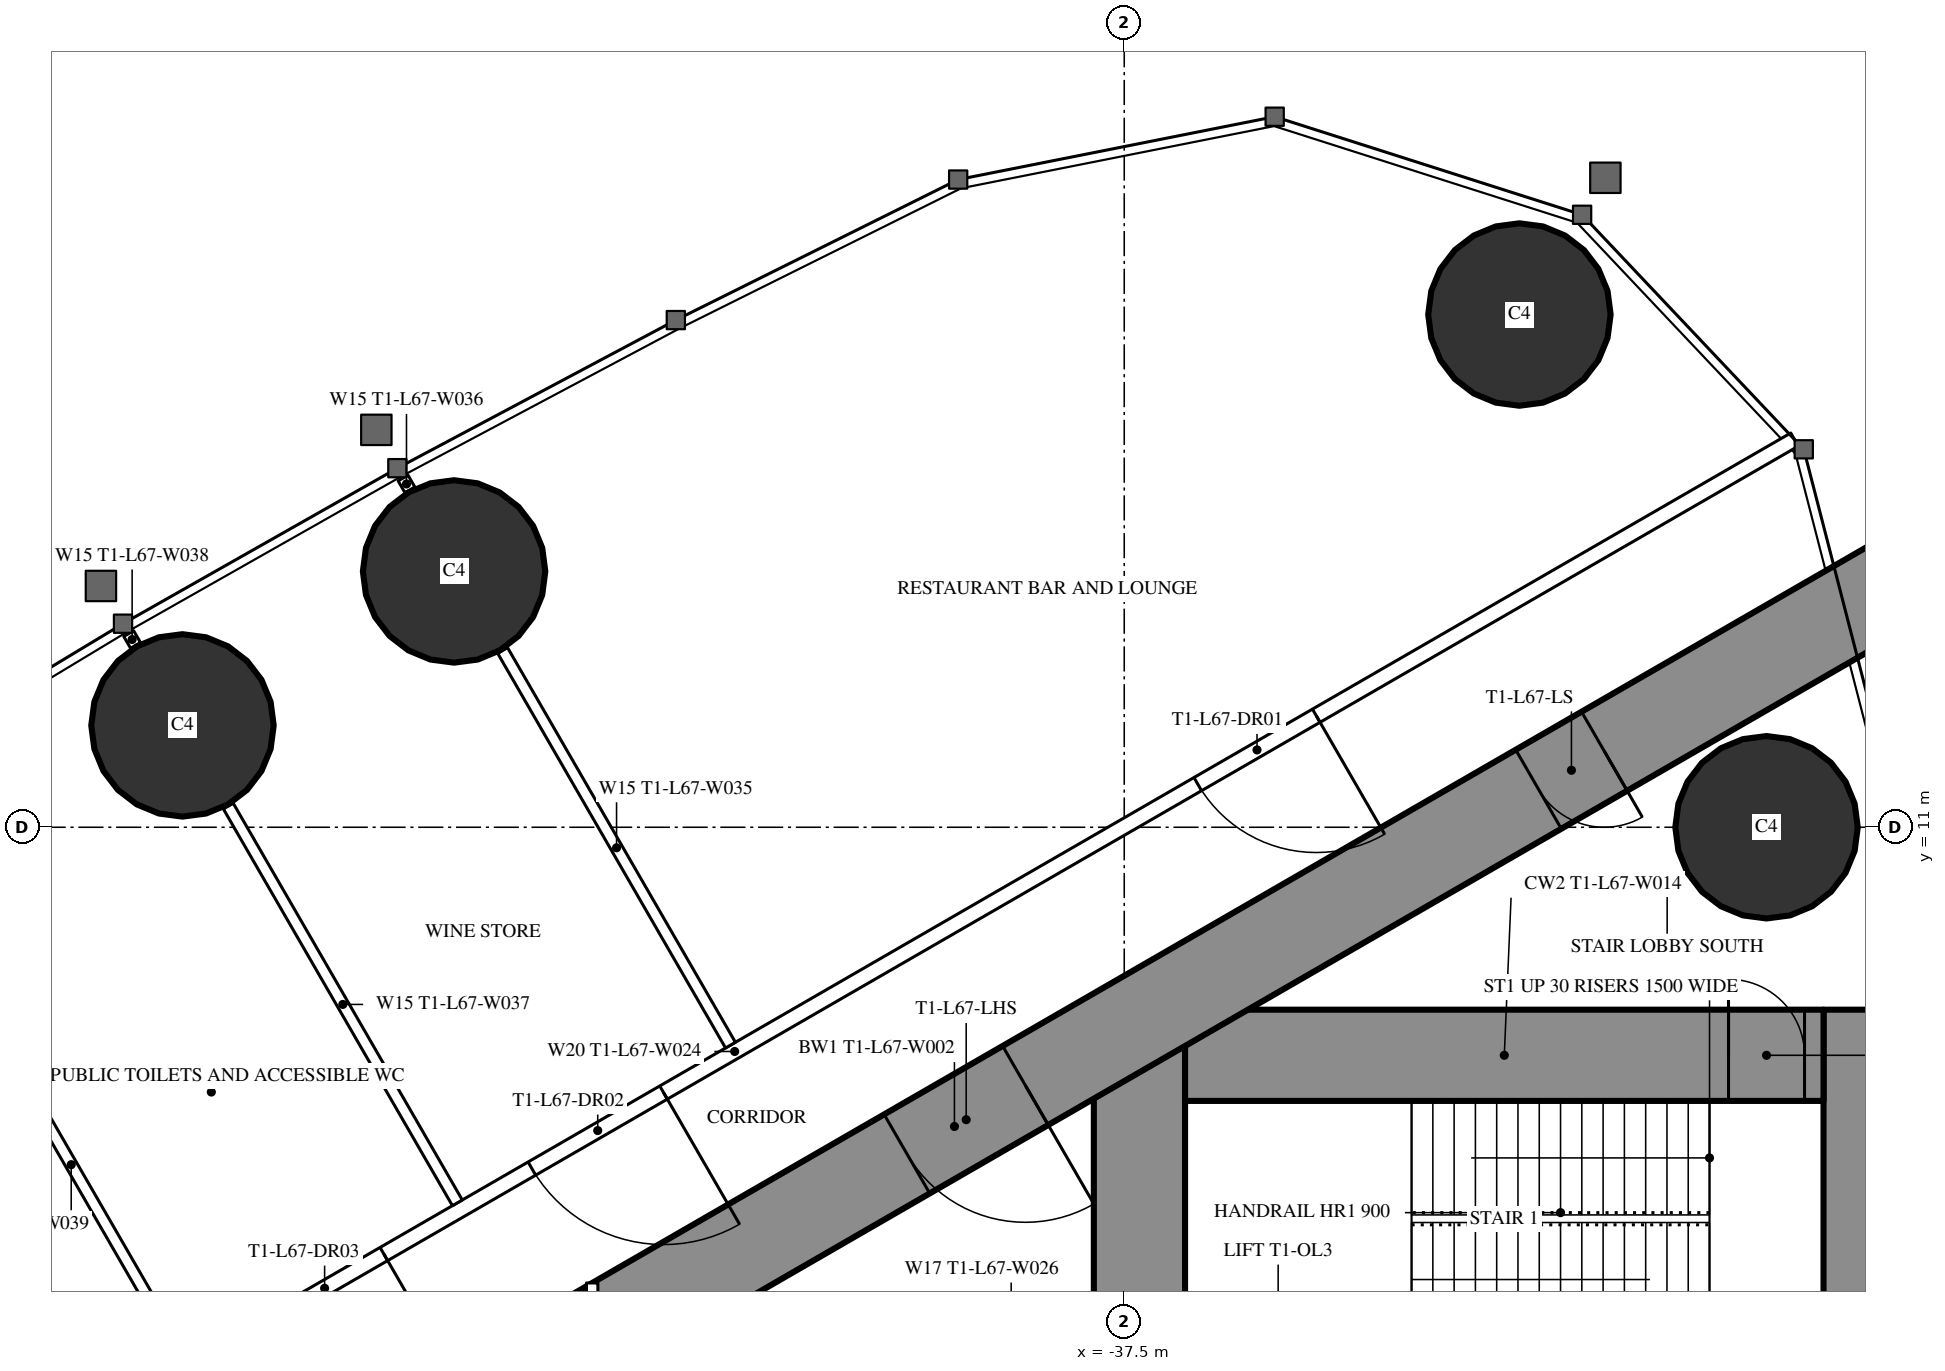
"""IFC4 building model, lengths in metres.
Left out: names, types, materials, properties, quantities, classifications, styles, units other than length and angle.
Written with IfcOpenShell. Run it as: python <this file> out.ifc"""

import sys

from ifc_helpers import new_model, si_unit, direction, frame, frame_2d, origin, origin_2d, place, context, subcontext, project, spatial, rectangle, circle, extrude, element, fill, save


model = new_model("IFC4")
c1 = context("Model", 3, precision=1e-05, world=origin(), true_north=direction((0.0, 1.0)))
c2 = subcontext(c1, "Body", "Model", "MODEL_VIEW")
j1 = project(units=[si_unit("LENGTHUNIT", "METRE"), si_unit("PLANEANGLEUNIT", "RADIAN")], contexts=[c1])
p1 = place(None, origin())
s1 = spatial("IfcSite", under=j1, at=p1, CompositionType="ELEMENT")
p2 = place(p1, origin())
s2 = spatial("IfcBuilding", under=s1, at=p2, CompositionType="ELEMENT")
p3 = place(p2, frame((0.0, 0.0, 251.9)))
s3 = spatial("IfcBuildingStorey", under=s2, at=p3, CompositionType="ELEMENT", Elevation=251.9)
for number, where, z_axis, x_axis in (
    (1, (-32.301, 17.745, 0.0), (0.0, 0.0, 1.0), (1.0, 0.0, 0.0)),
    (2, (-29.05, 11.0, 0.0), (0.0, 0.0, 1.0), (1.0, 0.0, 0.0)),
    (3, (-46.317, 14.365, 0.0), (0.0, 0.0, 1.0), (1.0, 0.0, 0.0)),
    (4, (-49.89, 12.34, 0.0), (0.0, 0.0, 1.0), (1.0, 0.0, 0.0)),
):
    element("IfcColumn", number, at=place(p3, frame(where, z_axis=z_axis, x_axis=x_axis)), inside=s3, PredefinedType="COLUMN", context=c2, shape_type="SweptSolid", body=[
        extrude(circle(Radius=1.2, at=origin_2d()), origin(), (0.0, 0.0, 1.0), 5.4),
    ])
p4 = place(p3, frame((-27.9, 8.6, 0.0), z_axis=(0.0, 0.0, 1.0), x_axis=(0.0, -1.0, 0.0)))
e5 = element("IfcWall", 5, at=p4, inside=s3, PredefinedType="SHEAR", context=c2, shape_type="SweptSolid", body=[
    extrude(rectangle(XDim=17.2, YDim=0.8, at=frame_2d((8.6, 0.0))), origin(), (0.0, 0.0, 1.0), 5.4),
])
p5 = place(p4, frame((6.95, 0.0, 0.0)))
e6 = element("IfcOpeningElement", 6, at=p5, cuts=e5, PredefinedType="OPENING", context=c2, shape_type="SweptSolid", body=[
    extrude(rectangle(XDim=0.9, YDim=2.2, at=frame_2d((0.45, 1.1))), frame((0.0, 0.41, 0.0), z_axis=(0.0, -1.0, 0.0), x_axis=(1.0, 0.0, 0.0)), (0.0, 0.0, 1.0), 0.82),
])
p6 = place(p3, frame((-37.3, 8.6, 0.0), z_axis=(0.0, 0.0, 1.0), x_axis=(0.0, -1.0, 0.0)))
e7 = element("IfcWall", 7, at=p6, inside=s3, PredefinedType="SHEAR", context=c2, shape_type="SweptSolid", body=[
    extrude(rectangle(XDim=17.2, YDim=1.2, at=frame_2d((8.6, 0.0))), origin(), (0.0, 0.0, 1.0), 5.4),
])
p7 = place(p6, frame((7.7, 0.0, 0.0)))
e8 = element("IfcOpeningElement", 8, at=p7, cuts=e7, PredefinedType="OPENING", context=c2, shape_type="SweptSolid", body=[
    extrude(rectangle(XDim=1.8, YDim=2.2, at=frame_2d((0.9, 1.1))), frame((0.0, 0.61, 0.0), z_axis=(0.0, -1.0, 0.0), x_axis=(1.0, 0.0, 0.0)), (0.0, 0.0, 1.0), 1.22),
])
p8 = place(p3, frame((-28.3, 8.0, 0.0), z_axis=(0.0, 0.0, 1.0), x_axis=(-1.0, 0.0, 0.0)))
e9 = element("IfcWall", 9, at=p8, inside=s3, PredefinedType="SHEAR", context=c2, shape_type="SweptSolid", body=[
    extrude(rectangle(XDim=8.4, YDim=1.2, at=frame_2d((4.2, 0.0))), origin(), (0.0, 0.0, 1.0), 5.4),
])
p9 = place(p8, frame((0.25, 0.0, 0.0)))
e10 = element("IfcOpeningElement", 10, at=p9, cuts=e9, PredefinedType="OPENING", context=c2, shape_type="SweptSolid", body=[
    extrude(rectangle(XDim=1.0, YDim=2.2, at=frame_2d((0.5, 1.1))), frame((0.0, 0.61, 0.0), z_axis=(0.0, -1.0, 0.0), x_axis=(1.0, 0.0, 0.0)), (0.0, 0.0, 1.0), 1.22),
])
p10 = place(p3, frame((-27.2, 14.3, 0.0), z_axis=(0.0, 0.0, 1.0), x_axis=(-0.866026593062, -0.499997940104, 0.0)))
e11 = element("IfcWall", 11, at=p10, inside=s3, PredefinedType="SHEAR", context=c2, shape_type="SweptSolid", body=[
    extrude(rectangle(XDim=28.946, YDim=1.2, at=frame_2d((14.473, 0.0))), origin(), (0.0, 0.0, 1.0), 5.4),
])
p11 = place(p10, frame((4.6, 0.0, 0.0)))
e12 = element("IfcOpeningElement", 12, at=p11, cuts=e11, PredefinedType="OPENING", context=c2, shape_type="SweptSolid", body=[
    extrude(rectangle(XDim=1.0, YDim=2.2, at=frame_2d((0.5, 1.1))), frame((0.0, 0.61, 0.0), z_axis=(0.0, -1.0, 0.0), x_axis=(1.0, 0.0, 0.0)), (0.0, 0.0, 1.0), 1.22),
])
p12 = place(p10, frame((13.395, 0.0, 0.0)))
e13 = element("IfcOpeningElement", 13, at=p12, cuts=e11, PredefinedType="OPENING", context=c2, shape_type="SweptSolid", body=[
    extrude(rectangle(XDim=1.8, YDim=2.2, at=frame_2d((0.9, 1.1))), frame((0.0, 0.61, 0.0), z_axis=(0.0, -1.0, 0.0), x_axis=(1.0, 0.0, 0.0)), (0.0, 0.0, 1.0), 1.22),
])
p13 = place(p3, frame((-28.681, 16.101, 0.0), z_axis=(0.0, 0.0, 1.0), x_axis=(-0.866024860443, -0.500000941094, 0.0)))
e14 = element("IfcWall", 14, at=p13, inside=s3, PredefinedType="PARTITIONING", context=c2, shape_type="SweptSolid", body=[
    extrude(rectangle(XDim=32.201, YDim=0.2, at=frame_2d((16.101, 0.0))), origin(), (0.0, 0.0, 1.0), 5.15),
])
p14 = place(p13, frame((7.266, 0.0, 0.0)))
e15 = element("IfcOpeningElement", 15, at=p14, cuts=e14, PredefinedType="OPENING", context=c2, shape_type="SweptSolid", body=[
    extrude(rectangle(XDim=1.8, YDim=2.2, at=frame_2d((0.9, 1.1))), frame((0.0, 0.11, 0.0), z_axis=(0.0, -1.0, 0.0), x_axis=(1.0, 0.0, 0.0)), (0.0, 0.0, 1.0), 0.22),
])
p15 = place(p13, frame((17.182, 0.0, 0.0)))
e16 = element("IfcOpeningElement", 16, at=p15, cuts=e14, PredefinedType="OPENING", context=c2, shape_type="SweptSolid", body=[
    extrude(rectangle(XDim=2.0, YDim=2.4, at=frame_2d((1.0, 1.2))), frame((0.0, 0.11, 0.0), z_axis=(0.0, -1.0, 0.0), x_axis=(1.0, 0.0, 0.0)), (0.0, 0.0, 1.0), 0.22),
])
p16 = place(p13, frame((21.43, 0.0, 0.0)))
e17 = element("IfcOpeningElement", 17, at=p16, cuts=e14, PredefinedType="OPENING", context=c2, shape_type="SweptSolid", body=[
    extrude(rectangle(XDim=1.8, YDim=2.2, at=frame_2d((0.9, 1.1))), frame((0.0, 0.11, 0.0), z_axis=(0.0, -1.0, 0.0), x_axis=(1.0, 0.0, 0.0)), (0.0, 0.0, 1.0), 0.22),
])
p17 = place(p13, frame((27.29, 0.0, 0.0)))
e18 = element("IfcOpeningElement", 18, at=p17, cuts=e14, PredefinedType="OPENING", context=c2, shape_type="SweptSolid", body=[
    extrude(rectangle(XDim=1.8, YDim=2.2, at=frame_2d((0.9, 1.1))), frame((0.0, 0.11, 0.0), z_axis=(0.0, -1.0, 0.0), x_axis=(1.0, 0.0, 0.0)), (0.0, 0.0, 1.0), 0.22),
])
p18 = place(p3, frame((-42.68, 8.134, 0.0), z_axis=(0.0, 0.0, 1.0), x_axis=(-0.499984479505, 0.866034364361, 0.0)))
e19 = element("IfcWall", 19, at=p18, inside=s3, PredefinedType="PARTITIONING", context=c2, shape_type="SweptSolid", body=[
    extrude(rectangle(XDim=5.995, YDim=0.15, at=frame_2d((2.998, 0.0))), origin(), (0.0, 0.0, 1.0), 4.25),
])
p19 = place(p3, frame((-46.898, 15.439, 0.0), z_axis=(0.0, 0.0, 1.0), x_axis=(-0.500232303069, 0.865891241997, 0.0)))
e20 = element("IfcWall", 20, at=p19, inside=s3, PredefinedType="PARTITIONING", context=c2, shape_type="SweptSolid", body=[
    extrude(rectangle(XDim=0.18, YDim=0.15, at=frame_2d((0.09, 0.0))), origin(), (0.0, 0.0, 1.0), 4.25),
])
p20 = place(p3, frame((-46.274, 6.059, 0.0), z_axis=(0.0, 0.0, 1.0), x_axis=(-0.500020471368, 0.866013584312, 0.0)))
e21 = element("IfcWall", 21, at=p20, inside=s3, PredefinedType="PARTITIONING", context=c2, shape_type="SweptSolid", body=[
    extrude(rectangle(XDim=6.028, YDim=0.15, at=frame_2d((3.014, 0.0))), origin(), (0.0, 0.0, 1.0), 4.25),
])
p21 = place(p3, frame((-50.508, 13.392, 0.0), z_axis=(0.0, 0.0, 1.0), x_axis=(-0.499644091975, 0.866230789891, 0.0)))
e22 = element("IfcWall", 22, at=p21, inside=s3, PredefinedType="PARTITIONING", context=c2, shape_type="SweptSolid", body=[
    extrude(rectangle(XDim=0.18, YDim=0.15, at=frame_2d((0.09, 0.0))), origin(), (0.0, 0.0, 1.0), 4.25),
])
p22 = place(p3, frame((-49.866, 3.985, 0.0), z_axis=(0.0, 0.0, 1.0), x_axis=(-0.500000694566, 0.866025002776, 0.0)))
e23 = element("IfcWall", 23, at=p22, inside=s3, PredefinedType="PARTITIONING", context=c2, shape_type="SweptSolid", body=[
    extrude(rectangle(XDim=5.95, YDim=0.15, at=frame_2d((2.975, 0.0))), origin(), (0.0, 0.0, 1.0), 4.25),
])
p23 = place(p3, frame((-44.5, 5.005, 0.0), z_axis=(0.0, 0.0, 1.0), x_axis=(0.0, -1.0, 0.0)))
e24 = element("IfcWall", 24, at=p23, inside=s3, PredefinedType="PARTITIONING", context=c2, shape_type="SweptSolid", body=[
    extrude(rectangle(XDim=10.009, YDim=0.15, at=frame_2d((5.005, 0.0))), origin(), (0.0, 0.0, 1.0), 4.3),
])
p24 = place(p23, frame((2.002, 0.0, 0.0)))
e25 = element("IfcOpeningElement", 25, at=p24, cuts=e24, PredefinedType="OPENING", context=c2, shape_type="SweptSolid", body=[
    extrude(rectangle(XDim=1.0, YDim=2.2, at=frame_2d((0.5, 1.1))), frame((0.0, 0.085, 0.0), z_axis=(0.0, -1.0, 0.0), x_axis=(1.0, 0.0, 0.0)), (0.0, 0.0, 1.0), 0.17),
])
p25 = place(p23, frame((7.007, 0.0, 0.0)))
e26 = element("IfcOpeningElement", 26, at=p25, cuts=e24, PredefinedType="OPENING", context=c2, shape_type="SweptSolid", body=[
    extrude(rectangle(XDim=1.0, YDim=2.2, at=frame_2d((0.5, 1.1))), frame((0.0, 0.085, 0.0), z_axis=(0.0, -1.0, 0.0), x_axis=(1.0, 0.0, 0.0)), (0.0, 0.0, 1.0), 0.17),
])
p26 = place(p14, origin())
e27 = element("IfcDoor", 27, at=p26, inside=s3, OperationType="DOUBLE_DOOR_SINGLE_SWING", PredefinedType="DOOR", context=c2, shape_type="SweptSolid", body=[
    extrude(rectangle(XDim=1.8, YDim=2.2, at=frame_2d((0.9, 1.1))), frame((0.0, 0.025, 0.0), z_axis=(0.0, -1.0, 0.0), x_axis=(1.0, 0.0, 0.0)), (0.0, 0.0, 1.0), 0.05),
])
fill(e15, e27)
p27 = place(p15, origin())
e28 = element("IfcDoor", 28, at=p27, inside=s3, OperationType="DOUBLE_DOOR_SINGLE_SWING", PredefinedType="DOOR", context=c2, shape_type="SweptSolid", body=[
    extrude(rectangle(XDim=2.0, YDim=2.4, at=frame_2d((1.0, 1.2))), frame((0.0, 0.025, 0.0), z_axis=(0.0, -1.0, 0.0), x_axis=(1.0, 0.0, 0.0)), (0.0, 0.0, 1.0), 0.05),
])
fill(e16, e28)
p28 = place(p16, origin())
e29 = element("IfcDoor", 29, at=p28, inside=s3, OperationType="DOUBLE_DOOR_SINGLE_SWING", PredefinedType="DOOR", context=c2, shape_type="SweptSolid", body=[
    extrude(rectangle(XDim=1.8, YDim=2.2, at=frame_2d((0.9, 1.1))), frame((0.0, 0.025, 0.0), z_axis=(0.0, -1.0, 0.0), x_axis=(1.0, 0.0, 0.0)), (0.0, 0.0, 1.0), 0.05),
])
fill(e17, e29)
p29 = place(p11, origin())
e30 = element("IfcDoor", 30, at=p29, inside=s3, OperationType="SINGLE_SWING_LEFT", PredefinedType="DOOR", context=c2, shape_type="SweptSolid", body=[
    extrude(rectangle(XDim=1.0, YDim=2.2, at=frame_2d((0.5, 1.1))), frame((0.0, 0.025, 0.0), z_axis=(0.0, -1.0, 0.0), x_axis=(1.0, 0.0, 0.0)), (0.0, 0.0, 1.0), 0.05),
])
fill(e12, e30)
p30 = place(p12, origin())
e31 = element("IfcDoor", 31, at=p30, inside=s3, OperationType="DOUBLE_DOOR_SINGLE_SWING", PredefinedType="DOOR", context=c2, shape_type="SweptSolid", body=[
    extrude(rectangle(XDim=1.8, YDim=2.2, at=frame_2d((0.9, 1.1))), frame((0.0, 0.025, 0.0), z_axis=(0.0, -1.0, 0.0), x_axis=(1.0, 0.0, 0.0)), (0.0, 0.0, 1.0), 0.05),
])
fill(e13, e31)
p31 = place(p9, origin())
e32 = element("IfcDoor", 32, at=p31, inside=s3, OperationType="SINGLE_SWING_RIGHT", PredefinedType="DOOR", context=c2, shape_type="SweptSolid", body=[
    extrude(rectangle(XDim=1.0, YDim=2.2, at=frame_2d((0.5, 1.1))), frame((0.0, 0.025, 0.0), z_axis=(0.0, -1.0, 0.0), x_axis=(1.0, 0.0, 0.0)), (0.0, 0.0, 1.0), 0.05),
])
fill(e10, e32)
save(model, sys.argv[1])
